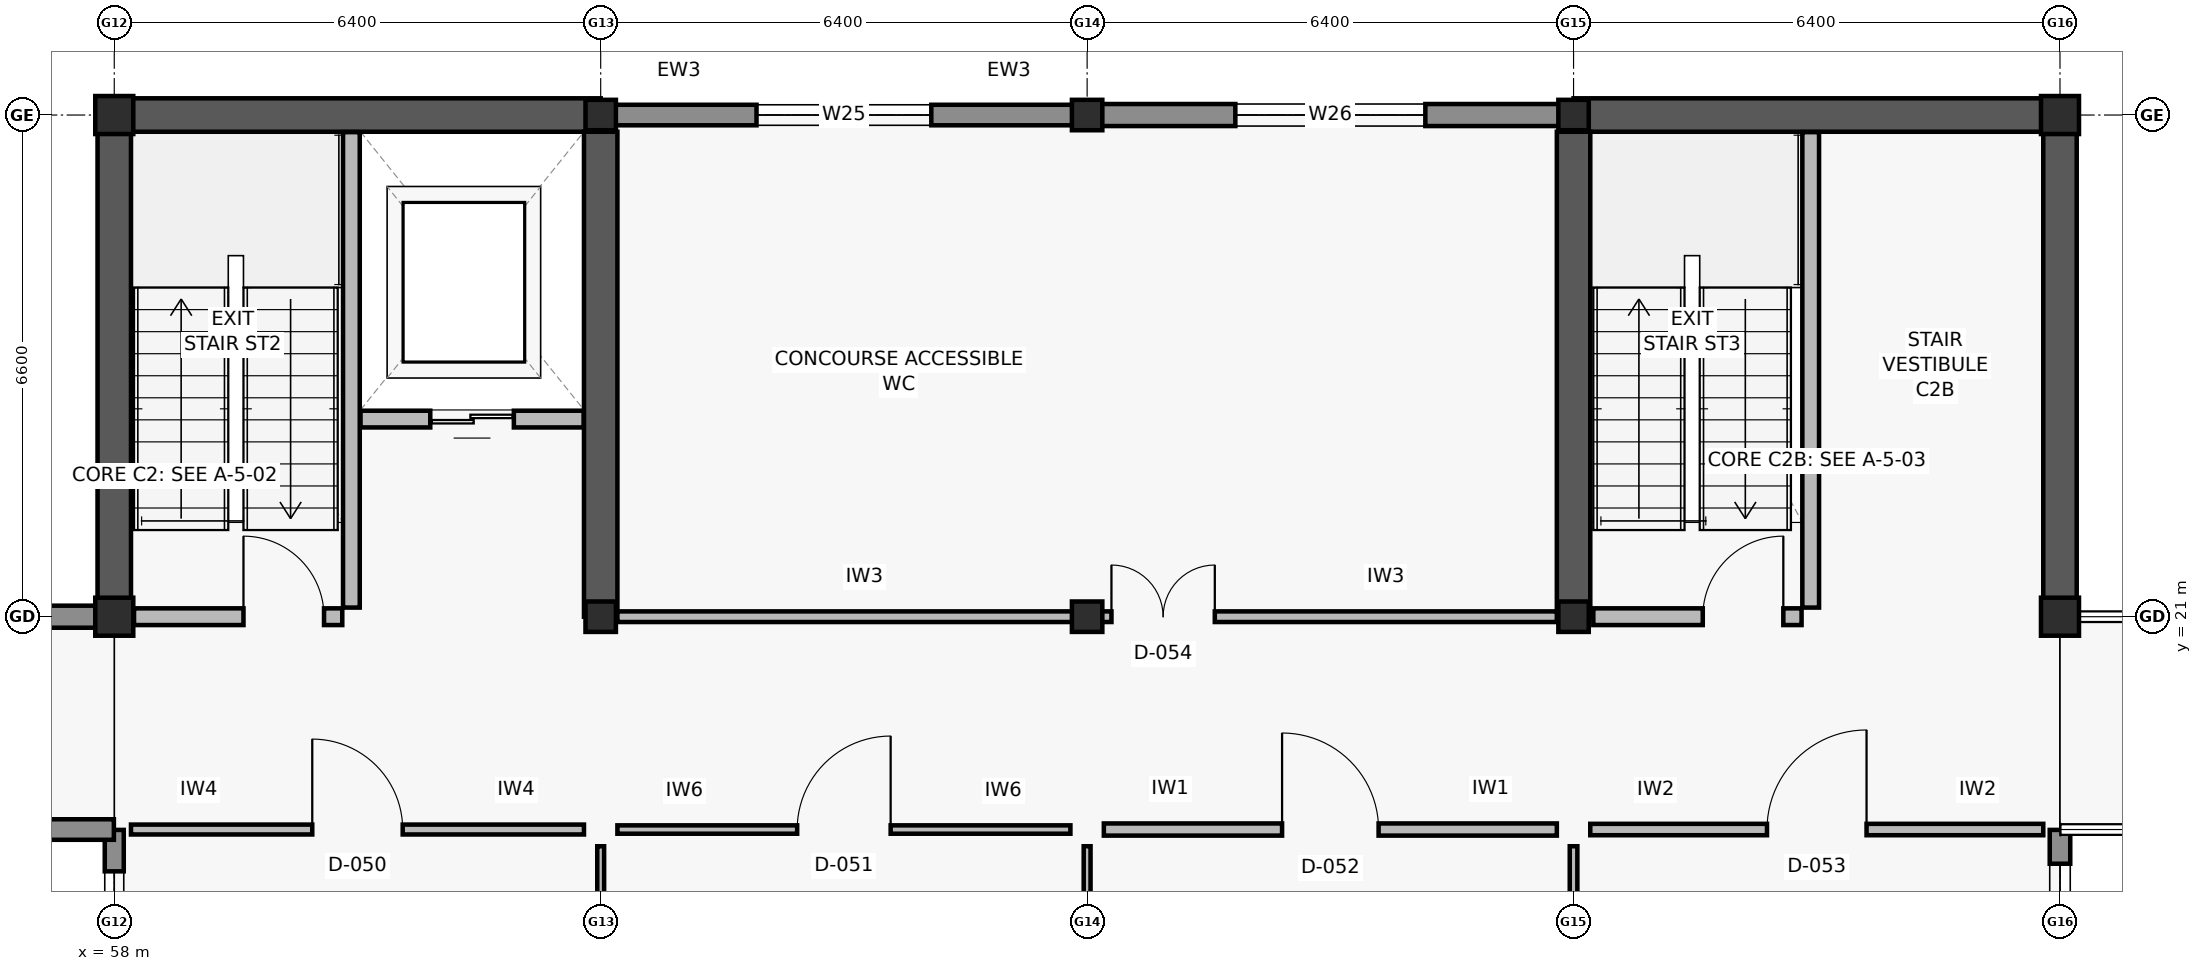
"""IFC4 building model, lengths in metres.
Left out: names, types, materials, properties, quantities, classifications, styles, units other than length and angle.
Written with IfcOpenShell. Run it as: python <this file> out.ifc"""

import sys

from ifc_helpers import new_model, si_unit, direction, frame, frame_2d, origin, origin_2d, place, context, subcontext, project, spatial, rectangle, i_section, extrude, element, fill, save


model = new_model("IFC4")
c1 = context("Model", 3, precision=1e-05, world=origin(), true_north=direction((0.0, 1.0)))
c2 = subcontext(c1, "Body", "Model", "MODEL_VIEW")
j1 = project(units=[si_unit("LENGTHUNIT", "METRE"), si_unit("PLANEANGLEUNIT", "RADIAN")], contexts=[c1])
p1 = place(None, origin())
s1 = spatial("IfcSite", under=j1, at=p1, CompositionType="ELEMENT")
p2 = place(p1, origin())
s2 = spatial("IfcBuilding", under=s1, at=p2, CompositionType="ELEMENT")
p3 = place(p2, frame((0.0, 0.0, 5.4)))
s3 = spatial("IfcBuildingStorey", under=s2, at=p3, CompositionType="ELEMENT", Elevation=5.4)
for number, where, z_axis, x_axis in (
    (1, (58.0, 21.0, 0.0), (0.0, 0.0, 1.0), (1.0, 0.0, 0.0)),
    (2, (58.0, 27.6, 0.0), (0.0, 0.0, 1.0), (1.0, 0.0, 0.0)),
):
    element("IfcColumn", number, at=place(p3, frame(where, z_axis=z_axis, x_axis=x_axis)), inside=s3, PredefinedType="COLUMN", context=c2, shape_type="SweptSolid", body=[
        extrude(i_section(OverallWidth=0.5, OverallDepth=0.5, WebThickness=0.02, FlangeThickness=0.036, at=origin_2d()), origin(), (0.0, 0.0, 1.0), 4.2),
    ])
for number, where, z_axis, x_axis in (
    (3, (64.4, 21.0, 0.0), (0.0, 0.0, 1.0), (1.0, 0.0, 0.0)),
    (4, (64.4, 27.6, 0.0), (0.0, 0.0, 1.0), (1.0, 0.0, 0.0)),
    (5, (70.8, 21.0, 0.0), (0.0, 0.0, 1.0), (1.0, 0.0, 0.0)),
    (6, (70.8, 27.6, 0.0), (0.0, 0.0, 1.0), (1.0, 0.0, 0.0)),
    (7, (77.2, 21.0, 0.0), (0.0, 0.0, 1.0), (1.0, 0.0, 0.0)),
    (8, (77.2, 27.6, 0.0), (0.0, 0.0, 1.0), (1.0, 0.0, 0.0)),
):
    element("IfcColumn", number, at=place(p3, frame(where, z_axis=z_axis, x_axis=x_axis)), inside=s3, PredefinedType="COLUMN", context=c2, shape_type="SweptSolid", body=[
        extrude(i_section(OverallWidth=0.4, OverallDepth=0.4, WebThickness=0.02, FlangeThickness=0.032, at=origin_2d()), origin(), (0.0, 0.0, 1.0), 4.2),
    ])
for number, where, z_axis, x_axis in (
    (9, (83.6, 21.0, 0.0), (0.0, 0.0, 1.0), (1.0, 0.0, 0.0)),
    (10, (83.6, 27.6, 0.0), (0.0, 0.0, 1.0), (1.0, 0.0, 0.0)),
):
    element("IfcColumn", number, at=place(p3, frame(where, z_axis=z_axis, x_axis=x_axis)), inside=s3, PredefinedType="COLUMN", context=c2, shape_type="SweptSolid", body=[
        extrude(i_section(OverallWidth=0.5, OverallDepth=0.5, WebThickness=0.02, FlangeThickness=0.036, at=origin_2d()), origin(), (0.0, 0.0, 1.0), 4.2),
    ])
p4 = place(p3, frame((58.0, 27.6, 0.0), z_axis=(0.0, 0.0, 1.0), x_axis=(1.0, 0.0, 0.0)))
e11 = element("IfcWall", 11, at=p4, inside=s3, PredefinedType="SHEAR", context=c2, shape_type="SweptSolid", body=[
    extrude(rectangle(XDim=6.4, YDim=0.44, at=frame_2d((3.2, 0.0))), origin(), (0.0, 0.0, 1.0), 3.96),
])
for number, where, z_axis, x_axis in (
    (12, (58.0, 21.0, 0.0), (0.0, 0.0, 1.0), (0.0, 1.0, 0.0)),
    (13, (64.4, 21.0, 0.0), (0.0, 0.0, 1.0), (0.0, 1.0, 0.0)),
):
    element("IfcWall", number, at=place(p3, frame(where, z_axis=z_axis, x_axis=x_axis)), inside=s3, PredefinedType="SHEAR", context=c2, shape_type="SweptSolid", body=[
        extrude(rectangle(XDim=6.38, YDim=0.44, at=frame_2d((3.19, 0.0))), origin(), (0.0, 0.0, 1.0), 3.96),
    ])
p5 = place(p3, frame((77.2, 27.6, 0.0), z_axis=(0.0, 0.0, 1.0), x_axis=(1.0, 0.0, 0.0)))
e14 = element("IfcWall", 14, at=p5, inside=s3, PredefinedType="SHEAR", context=c2, shape_type="SweptSolid", body=[
    extrude(rectangle(XDim=6.4, YDim=0.44, at=frame_2d((3.2, 0.0))), origin(), (0.0, 0.0, 1.0), 3.96),
])
for number, where, z_axis, x_axis in (
    (15, (77.2, 21.0, 0.0), (0.0, 0.0, 1.0), (0.0, 1.0, 0.0)),
    (16, (83.6, 21.0, 0.0), (0.0, 0.0, 1.0), (0.0, 1.0, 0.0)),
):
    element("IfcWall", number, at=place(p3, frame(where, z_axis=z_axis, x_axis=x_axis)), inside=s3, PredefinedType="SHEAR", context=c2, shape_type="SweptSolid", body=[
        extrude(rectangle(XDim=6.38, YDim=0.44, at=frame_2d((3.19, 0.0))), origin(), (0.0, 0.0, 1.0), 3.96),
    ])
p6 = place(p3, frame((64.405, 27.6, 0.0), z_axis=(0.0, 0.0, 1.0), x_axis=(1.0, 0.0, 0.0)))
e17 = element("IfcWall", 17, at=p6, inside=s3, PredefinedType="SOLIDWALL", context=c2, shape_type="SweptSolid", body=[
    extrude(rectangle(XDim=6.39, YDim=0.27, at=frame_2d((3.195, 0.0))), origin(), (0.0, 0.0, 1.0), 3.32),
])
p7 = place(p6, frame((2.045, 0.0, 0.72)))
e18 = element("IfcOpeningElement", 18, at=p7, cuts=e17, PredefinedType="OPENING", context=c2, shape_type="SweptSolid", body=[
    extrude(rectangle(XDim=2.3, YDim=1.15, at=frame_2d((1.15, 0.575))), frame((0.0, 0.145, 0.0), z_axis=(0.0, -1.0, 0.0), x_axis=(1.0, 0.0, 0.0)), (0.0, 0.0, 1.0), 0.29),
])
p8 = place(p3, frame((70.805, 27.6, 0.0), z_axis=(0.0, 0.0, 1.0), x_axis=(1.0, 0.0, 0.0)))
e19 = element("IfcWall", 19, at=p8, inside=s3, PredefinedType="SOLIDWALL", context=c2, shape_type="SweptSolid", body=[
    extrude(rectangle(XDim=6.39, YDim=0.29, at=frame_2d((3.195, 0.0))), origin(), (0.0, 0.0, 1.0), 3.32),
])
p9 = place(p8, frame((1.945, 0.0, 0.72)))
e20 = element("IfcOpeningElement", 20, at=p9, cuts=e19, PredefinedType="OPENING", context=c2, shape_type="SweptSolid", body=[
    extrude(rectangle(XDim=2.5, YDim=1.15, at=frame_2d((1.25, 0.575))), frame((0.0, 0.155, 0.0), z_axis=(0.0, -1.0, 0.0), x_axis=(1.0, 0.0, 0.0)), (0.0, 0.0, 1.0), 0.31),
])
p10 = place(p3, frame((58.0, 14.405, 0.0), z_axis=(0.0, 0.0, 1.0), x_axis=(0.0, 1.0, 0.0)))
e21 = element("IfcWall", 21, at=p10, inside=s3, PredefinedType="SOLIDWALL", context=c2, shape_type="SweptSolid", body=[
    extrude(rectangle(XDim=3.79, YDim=0.25, at=frame_2d((1.895, 0.0))), origin(), (0.0, 0.0, 1.0), 3.32),
])
p11 = place(p10, frame((0.545, 0.0, 0.72)))
e22 = element("IfcOpeningElement", 22, at=p11, cuts=e21, PredefinedType="OPENING", context=c2, shape_type="SweptSolid", body=[
    extrude(rectangle(XDim=2.7, YDim=1.15, at=frame_2d((1.35, 0.575))), frame((0.0, 0.135, 0.0), z_axis=(0.0, -1.0, 0.0), x_axis=(1.0, 0.0, 0.0)), (0.0, 0.0, 1.0), 0.27),
])
p12 = place(p3, frame((83.6, 18.195, 0.0), z_axis=(0.0, 0.0, 1.0), x_axis=(0.0, -1.0, 0.0)))
e23 = element("IfcWall", 23, at=p12, inside=s3, PredefinedType="SOLIDWALL", context=c2, shape_type="SweptSolid", body=[
    extrude(rectangle(XDim=3.79, YDim=0.27, at=frame_2d((1.895, 0.0))), origin(), (0.0, 0.0, 1.0), 3.32),
])
p13 = place(p12, frame((0.445, 0.0, 0.72)))
e24 = element("IfcOpeningElement", 24, at=p13, cuts=e23, PredefinedType="OPENING", context=c2, shape_type="SweptSolid", body=[
    extrude(rectangle(XDim=2.9, YDim=1.15, at=frame_2d((1.45, 0.575))), frame((0.0, 0.145, 0.0), z_axis=(0.0, -1.0, 0.0), x_axis=(1.0, 0.0, 0.0)), (0.0, 0.0, 1.0), 0.29),
])
p14 = place(p3, frame((57.995, 18.2, 0.0), z_axis=(0.0, 0.0, 1.0), x_axis=(-1.0, 0.0, 0.0)))
e25 = element("IfcWall", 25, at=p14, inside=s3, PredefinedType="SOLIDWALL", context=c2, shape_type="SweptSolid", body=[
    extrude(rectangle(XDim=1.19, YDim=0.27, at=frame_2d((0.595, 0.0))), origin(), (0.0, 0.0, 1.0), 3.32),
])
p15 = place(p3, frame((56.805, 21.0, 0.0), z_axis=(0.0, 0.0, 1.0), x_axis=(1.0, 0.0, 0.0)))
e26 = element("IfcWall", 26, at=p15, inside=s3, PredefinedType="SOLIDWALL", context=c2, shape_type="SweptSolid", body=[
    extrude(rectangle(XDim=1.19, YDim=0.29, at=frame_2d((0.595, 0.0))), origin(), (0.0, 0.0, 1.0), 3.32),
])
p16 = place(p3, frame((61.12, 21.12, 0.0), z_axis=(0.0, 0.0, 1.0), x_axis=(0.0, 1.0, 0.0)))
e27 = element("IfcWall", 27, at=p16, inside=s3, PredefinedType="SOLIDWALL", context=c2, shape_type="SweptSolid", body=[
    extrude(rectangle(XDim=6.255, YDim=0.22, at=frame_2d((3.127, 0.0))), origin(), (0.0, 0.0, 1.0), 3.96),
])
p17 = place(p3, frame((58.26, 21.0, 0.0), z_axis=(0.0, 0.0, 1.0), x_axis=(1.0, 0.0, 0.0)))
e28 = element("IfcWall", 28, at=p17, inside=s3, PredefinedType="SOLIDWALL", context=c2, shape_type="SweptSolid", body=[
    extrude(rectangle(XDim=2.74, YDim=0.22, at=frame_2d((1.37, 0.0))), origin(), (0.0, 0.0, 1.0), 3.32),
])
p18 = place(p17, frame((1.44, 0.0, 0.0)))
e29 = element("IfcOpeningElement", 29, at=p18, cuts=e28, PredefinedType="OPENING", context=c2, shape_type="SweptSolid", body=[
    extrude(rectangle(XDim=1.06, YDim=2.1, at=frame_2d((0.53, 1.05))), frame((0.0, 0.12, 0.0), z_axis=(0.0, -1.0, 0.0), x_axis=(1.0, 0.0, 0.0)), (0.0, 0.0, 1.0), 0.24),
])
p19 = place(p3, frame((61.24, 23.6, 0.0), z_axis=(0.0, 0.0, 1.0), x_axis=(1.0, 0.0, 0.0)))
e30 = element("IfcWall", 30, at=p19, inside=s3, PredefinedType="SOLIDWALL", context=c2, shape_type="SweptSolid", body=[
    extrude(rectangle(XDim=2.935, YDim=0.22, at=frame_2d((1.468, 0.0))), origin(), (0.0, 0.0, 1.0), 3.96),
])
p20 = place(p19, frame((0.917, 0.0, 0.0)))
e31 = element("IfcOpeningElement", 31, at=p20, cuts=e30, PredefinedType="OPENING", context=c2, shape_type="SweptSolid", body=[
    extrude(rectangle(XDim=1.1, YDim=2.1, at=frame_2d((0.55, 1.05))), frame((0.0, 0.12, 0.0), z_axis=(0.0, -1.0, 0.0), x_axis=(1.0, 0.0, 0.0)), (0.0, 0.0, 1.0), 0.24),
])
p21 = place(p3, frame((80.32, 21.12, 0.0), z_axis=(0.0, 0.0, 1.0), x_axis=(0.0, 1.0, 0.0)))
e32 = element("IfcWall", 32, at=p21, inside=s3, PredefinedType="SOLIDWALL", context=c2, shape_type="SweptSolid", body=[
    extrude(rectangle(XDim=6.255, YDim=0.22, at=frame_2d((3.127, 0.0))), origin(), (0.0, 0.0, 1.0), 3.96),
])
p22 = place(p3, frame((77.46, 21.0, 0.0), z_axis=(0.0, 0.0, 1.0), x_axis=(1.0, 0.0, 0.0)))
e33 = element("IfcWall", 33, at=p22, inside=s3, PredefinedType="SOLIDWALL", context=c2, shape_type="SweptSolid", body=[
    extrude(rectangle(XDim=2.74, YDim=0.22, at=frame_2d((1.37, 0.0))), origin(), (0.0, 0.0, 1.0), 3.32),
])
p23 = place(p22, frame((1.44, 0.0, 0.0)))
e34 = element("IfcOpeningElement", 34, at=p23, cuts=e33, PredefinedType="OPENING", context=c2, shape_type="SweptSolid", body=[
    extrude(rectangle(XDim=1.06, YDim=2.1, at=frame_2d((0.53, 1.05))), frame((0.0, 0.12, 0.0), z_axis=(0.0, -1.0, 0.0), x_axis=(1.0, 0.0, 0.0)), (0.0, 0.0, 1.0), 0.24),
])
p24 = place(p3, frame((64.4, 8.02, 0.0), z_axis=(0.0, 0.0, 1.0), x_axis=(0.0, 1.0, 0.0)))
e35 = element("IfcWall", 35, at=p24, inside=s3, PredefinedType="MOVABLE", context=c2, shape_type="SweptSolid", body=[
    extrude(rectangle(XDim=9.96, YDim=0.09, at=frame_2d((4.98, 0.0))), origin(), (0.0, 0.0, 1.0), 3.3),
])
p25 = place(p3, frame((58.22, 18.2, 0.0), z_axis=(0.0, 0.0, 1.0), x_axis=(1.0, 0.0, 0.0)))
e36 = element("IfcWall", 36, at=p25, inside=s3, PredefinedType="PARTITIONING", context=c2, shape_type="SweptSolid", body=[
    extrude(rectangle(XDim=5.96, YDim=0.13, at=frame_2d((2.98, 0.0))), origin(), (0.0, 0.0, 1.0), 3.3),
])
p26 = place(p25, frame((2.385, 0.0, 0.0)))
e37 = element("IfcOpeningElement", 37, at=p26, cuts=e36, PredefinedType="OPENING", context=c2, shape_type="SweptSolid", body=[
    extrude(rectangle(XDim=1.19, YDim=2.14, at=frame_2d((0.595, 1.07))), frame((0.0, 0.075, 0.0), z_axis=(0.0, -1.0, 0.0), x_axis=(1.0, 0.0, 0.0)), (0.0, 0.0, 1.0), 0.15),
])
p27 = place(p3, frame((70.8, 8.02, 0.0), z_axis=(0.0, 0.0, 1.0), x_axis=(0.0, 1.0, 0.0)))
e38 = element("IfcWall", 38, at=p27, inside=s3, PredefinedType="MOVABLE", context=c2, shape_type="SweptSolid", body=[
    extrude(rectangle(XDim=9.96, YDim=0.09, at=frame_2d((4.98, 0.0))), origin(), (0.0, 0.0, 1.0), 3.3),
])
p28 = place(p3, frame((64.62, 18.2, 0.0), z_axis=(0.0, 0.0, 1.0), x_axis=(1.0, 0.0, 0.0)))
e39 = element("IfcWall", 39, at=p28, inside=s3, PredefinedType="PARTITIONING", context=c2, shape_type="SweptSolid", body=[
    extrude(rectangle(XDim=5.96, YDim=0.11, at=frame_2d((2.98, 0.0))), origin(), (0.0, 0.0, 1.0), 3.3),
])
p29 = place(p28, frame((2.365, 0.0, 0.0)))
e40 = element("IfcOpeningElement", 40, at=p29, cuts=e39, PredefinedType="OPENING", context=c2, shape_type="SweptSolid", body=[
    extrude(rectangle(XDim=1.23, YDim=2.08, at=frame_2d((0.615, 1.04))), frame((0.0, 0.065, 0.0), z_axis=(0.0, -1.0, 0.0), x_axis=(1.0, 0.0, 0.0)), (0.0, 0.0, 1.0), 0.13),
])
p30 = place(p3, frame((77.2, 8.02, 0.0), z_axis=(0.0, 0.0, 1.0), x_axis=(0.0, 1.0, 0.0)))
e41 = element("IfcWall", 41, at=p30, inside=s3, PredefinedType="PARTITIONING", context=c2, shape_type="SweptSolid", body=[
    extrude(rectangle(XDim=9.96, YDim=0.1, at=frame_2d((4.98, 0.0))), origin(), (0.0, 0.0, 1.0), 3.3),
])
p31 = place(p3, frame((71.02, 18.2, 0.0), z_axis=(0.0, 0.0, 1.0), x_axis=(1.0, 0.0, 0.0)))
e42 = element("IfcWall", 42, at=p31, inside=s3, PredefinedType="PARTITIONING", context=c2, shape_type="SweptSolid", body=[
    extrude(rectangle(XDim=5.96, YDim=0.16, at=frame_2d((2.98, 0.0))), origin(), (0.0, 0.0, 1.0), 3.3),
])
p32 = place(p31, frame((2.345, 0.0, 0.0)))
e43 = element("IfcOpeningElement", 43, at=p32, cuts=e42, PredefinedType="OPENING", context=c2, shape_type="SweptSolid", body=[
    extrude(rectangle(XDim=1.27, YDim=2.1, at=frame_2d((0.635, 1.05))), frame((0.0, 0.09, 0.0), z_axis=(0.0, -1.0, 0.0), x_axis=(1.0, 0.0, 0.0)), (0.0, 0.0, 1.0), 0.18),
])
p33 = place(p3, frame((77.42, 18.2, 0.0), z_axis=(0.0, 0.0, 1.0), x_axis=(1.0, 0.0, 0.0)))
e44 = element("IfcWall", 44, at=p33, inside=s3, PredefinedType="PARTITIONING", context=c2, shape_type="SweptSolid", body=[
    extrude(rectangle(XDim=5.96, YDim=0.15, at=frame_2d((2.98, 0.0))), origin(), (0.0, 0.0, 1.0), 3.3),
])
p34 = place(p33, frame((2.325, 0.0, 0.0)))
e45 = element("IfcOpeningElement", 45, at=p34, cuts=e44, PredefinedType="OPENING", context=c2, shape_type="SweptSolid", body=[
    extrude(rectangle(XDim=1.31, YDim=2.14, at=frame_2d((0.655, 1.07))), frame((0.0, 0.085, 0.0), z_axis=(0.0, -1.0, 0.0), x_axis=(1.0, 0.0, 0.0)), (0.0, 0.0, 1.0), 0.17),
])
p35 = place(p3, frame((64.62, 21.0, 0.0), z_axis=(0.0, 0.0, 1.0), x_axis=(1.0, 0.0, 0.0)))
e46 = element("IfcWall", 46, at=p35, inside=s3, PredefinedType="PARTITIONING", context=c2, shape_type="SweptSolid", body=[
    extrude(rectangle(XDim=12.36, YDim=0.14, at=frame_2d((6.18, 0.0))), origin(), (0.0, 0.0, 1.0), 3.3),
])
p36 = place(p35, frame((6.5, 0.0, 0.0)))
e47 = element("IfcOpeningElement", 47, at=p36, cuts=e46, PredefinedType="OPENING", context=c2, shape_type="SweptSolid", body=[
    extrude(rectangle(XDim=1.36, YDim=2.15, at=frame_2d((0.68, 1.075))), frame((0.0, 0.08, 0.0), z_axis=(0.0, -1.0, 0.0), x_axis=(1.0, 0.0, 0.0)), (0.0, 0.0, 1.0), 0.16),
])
p37 = place(p7, origin())
e48 = element("IfcWindow", 48, at=p37, inside=s3, PartitioningType="DOUBLE_PANEL_VERTICAL", PredefinedType="WINDOW", context=c2, shape_type="SweptSolid", body=[
    extrude(rectangle(XDim=2.3, YDim=1.15, at=frame_2d((1.15, 0.575))), frame((0.0, 0.03, 0.0), z_axis=(0.0, -1.0, 0.0), x_axis=(1.0, 0.0, 0.0)), (0.0, 0.0, 1.0), 0.06),
])
fill(e18, e48)
p38 = place(p9, origin())
e49 = element("IfcWindow", 49, at=p38, inside=s3, PartitioningType="TRIPLE_PANEL_VERTICAL", PredefinedType="WINDOW", context=c2, shape_type="SweptSolid", body=[
    extrude(rectangle(XDim=2.5, YDim=1.15, at=frame_2d((1.25, 0.575))), frame((0.0, 0.03, 0.0), z_axis=(0.0, -1.0, 0.0), x_axis=(1.0, 0.0, 0.0)), (0.0, 0.0, 1.0), 0.06),
])
fill(e20, e49)
p39 = place(p11, origin())
e50 = element("IfcWindow", 50, at=p39, inside=s3, PartitioningType="TRIPLE_PANEL_VERTICAL", PredefinedType="WINDOW", context=c2, shape_type="SweptSolid", body=[
    extrude(rectangle(XDim=2.7, YDim=1.15, at=frame_2d((1.35, 0.575))), frame((0.0, 0.03, 0.0), z_axis=(0.0, -1.0, 0.0), x_axis=(1.0, 0.0, 0.0)), (0.0, 0.0, 1.0), 0.06),
])
fill(e22, e50)
p40 = place(p13, origin())
e51 = element("IfcWindow", 51, at=p40, inside=s3, PartitioningType="TRIPLE_PANEL_VERTICAL", PredefinedType="WINDOW", context=c2, shape_type="SweptSolid", body=[
    extrude(rectangle(XDim=2.9, YDim=1.15, at=frame_2d((1.45, 0.575))), frame((0.0, 0.03, 0.0), z_axis=(0.0, -1.0, 0.0), x_axis=(1.0, 0.0, 0.0)), (0.0, 0.0, 1.0), 0.06),
])
fill(e24, e51)
p41 = place(p18, origin())
e52 = element("IfcDoor", 52, at=p41, inside=s3, OperationType="SINGLE_SWING_LEFT", PredefinedType="DOOR", context=c2, shape_type="SweptSolid", body=[
    extrude(rectangle(XDim=1.06, YDim=2.1, at=frame_2d((0.53, 1.05))), frame((0.0, 0.025, 0.0), z_axis=(0.0, -1.0, 0.0), x_axis=(1.0, 0.0, 0.0)), (0.0, 0.0, 1.0), 0.05),
])
fill(e29, e52)
p42 = place(p20, origin())
e53 = element("IfcDoor", 53, at=p42, inside=s3, OperationType="DOUBLE_DOOR_SLIDING", PredefinedType="DOOR", context=c2, shape_type="SweptSolid", body=[
    extrude(rectangle(XDim=1.1, YDim=2.1, at=frame_2d((0.55, 1.05))), frame((0.0, 0.025, 0.0), z_axis=(0.0, -1.0, 0.0), x_axis=(1.0, 0.0, 0.0)), (0.0, 0.0, 1.0), 0.05),
])
fill(e31, e53)
p43 = place(p23, origin())
e54 = element("IfcDoor", 54, at=p43, inside=s3, OperationType="SINGLE_SWING_RIGHT", PredefinedType="DOOR", context=c2, shape_type="SweptSolid", body=[
    extrude(rectangle(XDim=1.06, YDim=2.1, at=frame_2d((0.53, 1.05))), frame((0.0, 0.025, 0.0), z_axis=(0.0, -1.0, 0.0), x_axis=(1.0, 0.0, 0.0)), (0.0, 0.0, 1.0), 0.05),
])
fill(e34, e54)
p44 = place(p26, origin())
e55 = element("IfcDoor", 55, at=p44, inside=s3, OperationType="SINGLE_SWING_LEFT", PredefinedType="DOOR", context=c2, shape_type="SweptSolid", body=[
    extrude(rectangle(XDim=1.19, YDim=2.14, at=frame_2d((0.595, 1.07))), frame((0.0, 0.025, 0.0), z_axis=(0.0, -1.0, 0.0), x_axis=(1.0, 0.0, 0.0)), (0.0, 0.0, 1.0), 0.05),
])
fill(e37, e55)
p45 = place(p29, origin())
e56 = element("IfcDoor", 56, at=p45, inside=s3, OperationType="SINGLE_SWING_RIGHT", PredefinedType="DOOR", context=c2, shape_type="SweptSolid", body=[
    extrude(rectangle(XDim=1.23, YDim=2.08, at=frame_2d((0.615, 1.04))), frame((0.0, 0.025, 0.0), z_axis=(0.0, -1.0, 0.0), x_axis=(1.0, 0.0, 0.0)), (0.0, 0.0, 1.0), 0.05),
])
fill(e40, e56)
p46 = place(p32, origin())
e57 = element("IfcDoor", 57, at=p46, inside=s3, OperationType="SINGLE_SWING_LEFT", PredefinedType="DOOR", context=c2, shape_type="SweptSolid", body=[
    extrude(rectangle(XDim=1.27, YDim=2.1, at=frame_2d((0.635, 1.05))), frame((0.0, 0.025, 0.0), z_axis=(0.0, -1.0, 0.0), x_axis=(1.0, 0.0, 0.0)), (0.0, 0.0, 1.0), 0.05),
])
fill(e43, e57)
p47 = place(p34, origin())
e58 = element("IfcDoor", 58, at=p47, inside=s3, OperationType="SINGLE_SWING_RIGHT", PredefinedType="DOOR", context=c2, shape_type="SweptSolid", body=[
    extrude(rectangle(XDim=1.31, YDim=2.14, at=frame_2d((0.655, 1.07))), frame((0.0, 0.025, 0.0), z_axis=(0.0, -1.0, 0.0), x_axis=(1.0, 0.0, 0.0)), (0.0, 0.0, 1.0), 0.05),
])
fill(e45, e58)
p48 = place(p36, origin())
e59 = element("IfcDoor", 59, at=p48, inside=s3, OperationType="DOUBLE_DOOR_SINGLE_SWING", PredefinedType="DOOR", context=c2, shape_type="SweptSolid", body=[
    extrude(rectangle(XDim=1.36, YDim=2.15, at=frame_2d((0.68, 1.075))), frame((0.0, 0.025, 0.0), z_axis=(0.0, -1.0, 0.0), x_axis=(1.0, 0.0, 0.0)), (0.0, 0.0, 1.0), 0.05),
])
fill(e47, e59)
save(model, sys.argv[1])
